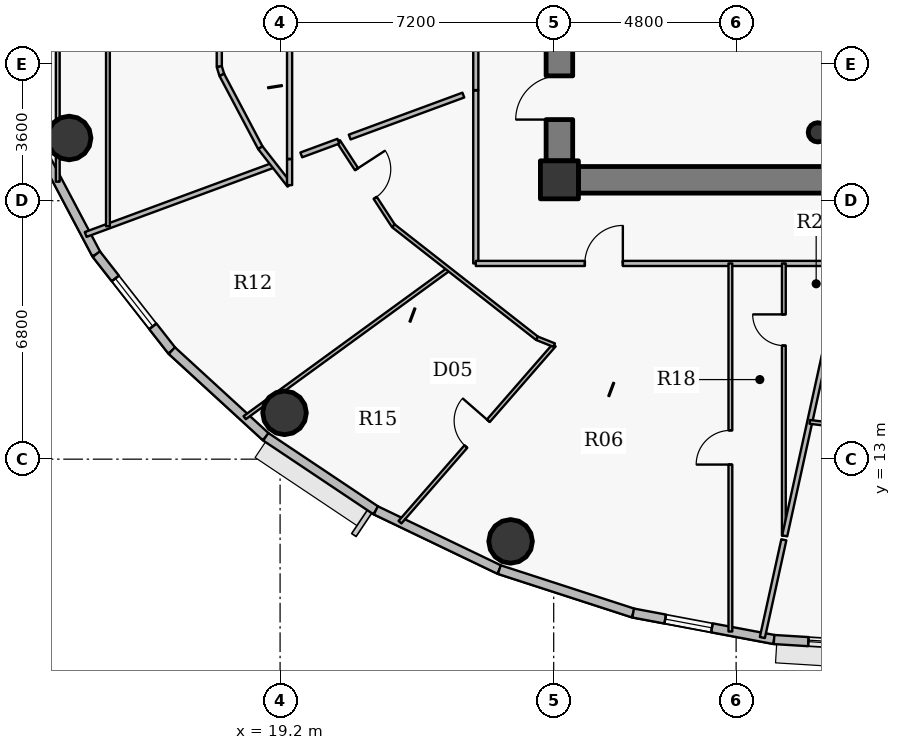
"""IFC4 building model, lengths in metres.
Left out: names, types, materials, properties, quantities, classifications, styles, units other than length and angle.
Written with IfcOpenShell. Run it as: python <this file> out.ifc"""

import sys

from ifc_helpers import new_model, si_unit, direction, frame, frame_2d, origin, origin_2d, place, context, subcontext, project, spatial, rectangle, hollow_circle, extrude, source, transform, mapped, element, fill, save


model = new_model("IFC4")
c1 = context("Model", 3, precision=1e-05, world=origin(), true_north=direction((0.0, 1.0)))
c2 = subcontext(c1, "Body", "Model", "MODEL_VIEW")
j1 = project(units=[si_unit("LENGTHUNIT", "METRE"), si_unit("PLANEANGLEUNIT", "RADIAN")], contexts=[c1])
p1 = place(None, origin())
s1 = spatial("IfcSite", under=j1, at=p1, CompositionType="ELEMENT")
p2 = place(p1, origin())
s2 = spatial("IfcBuilding", under=s1, at=p2, CompositionType="ELEMENT")
p3 = place(p2, frame((0.0, 0.0, 214.05)))
s3 = spatial("IfcBuildingStorey", under=s2, at=p3, CompositionType="ELEMENT", Elevation=214.05)
p4 = place(p3, frame((26.55, 20.35, 0.0), z_axis=(0.0, 0.0, 1.0), x_axis=(1.0, 0.0, 0.0)))
e1 = element("IfcColumn", 1, at=p4, inside=s3, PredefinedType="COLUMN", context=c2, shape_type="SweptSolid", body=[
    extrude(rectangle(XDim=1.0, YDim=1.0, at=origin_2d()), origin(), (0.0, 0.0, 1.0), 3.75),
])
p5 = place(p3, frame((33.35, 21.6, 0.0), z_axis=(0.0, 0.0, 1.0), x_axis=(1.0, 0.0, 0.0)))
e2 = element("IfcColumn", 2, at=p5, inside=s3, PredefinedType="COLUMN", context=c2, shape_type="SweptSolid", body=[
    extrude(hollow_circle(Radius=0.254, WallThickness=0.02, at=origin_2d()), origin(), (0.0, 0.0, 1.0), 3.75),
])
p6 = place(p3, frame((44.95, 20.35, 0.0), z_axis=(0.0, 0.0, 1.0), x_axis=(-1.0, 0.0, 0.0)))
e3 = element("IfcWall", 3, at=p6, inside=s3, PredefinedType="SHEAR", context=c2, shape_type="SweptSolid", body=[
    extrude(rectangle(XDim=17.9, YDim=0.7, at=frame_2d((8.95, 0.0))), origin(), (0.0, 0.0, 1.0), 3.05),
])
p7 = place(p6, frame((9.7, 0.0, 0.0)))
e4 = element("IfcOpeningElement", 4, at=p7, cuts=e3, PredefinedType="OPENING", context=c2, shape_type="SweptSolid", body=[
    extrude(rectangle(XDim=1.15, YDim=2.15, at=origin_2d()), frame((0.575, 0.36, 1.075), z_axis=(0.0, -1.0, 0.0), x_axis=(1.0, 0.0, 0.0)), (0.0, 0.0, 1.0), 0.72),
])
p8 = place(p3, frame((26.55, 20.85, 0.0), z_axis=(0.0, 0.0, 1.0), x_axis=(0.0, 1.0, 0.0)))
e5 = element("IfcWall", 5, at=p8, inside=s3, PredefinedType="SHEAR", context=c2, shape_type="SweptSolid", body=[
    extrude(rectangle(XDim=12.3, YDim=0.7, at=frame_2d((6.15, 0.0))), origin(), (0.0, 0.0, 1.0), 3.05),
])
p9 = place(p8, frame((1.085, 0.0, 0.0)))
e6 = element("IfcOpeningElement", 6, at=p9, cuts=e5, PredefinedType="OPENING", context=c2, shape_type="SweptSolid", body=[
    extrude(rectangle(XDim=1.15, YDim=2.15, at=origin_2d()), frame((0.575, 0.36, 1.075), z_axis=(0.0, -1.0, 0.0), x_axis=(1.0, 0.0, 0.0)), (0.0, 0.0, 1.0), 0.72),
])
for number, where, z_axis, x_axis in (
    (7, (13.649, 21.451, 0.0), (0.0, 0.0, 1.0), (1.0, 0.0, 0.0)),
    (8, (19.317, 14.219, 0.0), (0.0, 0.0, 1.0), (1.0, 0.0, 0.0)),
    (9, (25.265, 10.836, 0.0), (0.0, 0.0, 1.0), (1.0, 0.0, 0.0)),
):
    element("IfcColumn", number, at=place(p3, frame(where, z_axis=z_axis, x_axis=x_axis)), inside=s3, PredefinedType="COLUMN", context=c2, shape_type="SweptSolid", body=[
        extrude(hollow_circle(Radius=0.575, WallThickness=0.036, at=origin_2d()), origin(), (0.0, 0.0, 1.0), 3.75),
    ])
p10 = place(p3, frame((14.364, 18.395, 0.0), z_axis=(0.0, 0.0, 1.0), x_axis=(-0.46766049993, 0.883908172157, 0.0)))
e10 = element("IfcWall", 10, at=p10, inside=s3, PredefinedType="SOLIDWALL", context=c2, shape_type="SweptSolid", body=[
    extrude(rectangle(XDim=3.11, YDim=0.24, at=frame_2d((1.555, 0.0))), origin(), (0.0, 0.0, 1.0), 3.5),
])
p11 = place(p3, frame((16.352, 15.855, 0.0), z_axis=(0.0, 0.0, 1.0), x_axis=(-0.616312344705, 0.787501805562, 0.0)))
e11 = element("IfcWall", 11, at=p11, inside=s3, PredefinedType="SOLIDWALL", context=c2, shape_type="SweptSolid", body=[
    extrude(rectangle(XDim=3.225, YDim=0.24, at=frame_2d((1.612, 0.0))), origin(), (0.0, 0.0, 1.0), 3.5),
])
p12 = place(p11, frame((0.812, 0.0, 0.9)))
e12 = element("IfcOpeningElement", 12, at=p12, cuts=e11, PredefinedType="OPENING", context=c2, shape_type="SweptSolid", body=[
    extrude(rectangle(XDim=1.6, YDim=1.75, at=origin_2d()), frame((0.8, 0.13, 0.875), z_axis=(0.0, -1.0, 0.0), x_axis=(1.0, 0.0, 0.0)), (0.0, 0.0, 1.0), 0.26),
])
p13 = place(p3, frame((18.824, 13.589, 0.0), z_axis=(0.0, 0.0, 1.0), x_axis=(-0.737123922599, 0.675757591694, 0.0)))
e13 = element("IfcWall", 13, at=p13, inside=s3, PredefinedType="SOLIDWALL", context=c2, shape_type="SweptSolid", body=[
    extrude(rectangle(XDim=3.354, YDim=0.24, at=frame_2d((1.677, 0.0))), origin(), (0.0, 0.0, 1.0), 3.5),
])
p14 = place(p3, frame((21.72, 11.652, 0.0), z_axis=(0.0, 0.0, 1.0), x_axis=(-0.831262496074, 0.555880079352, 0.0)))
e14 = element("IfcWall", 14, at=p14, inside=s3, PredefinedType="SOLIDWALL", context=c2, shape_type="SweptSolid", body=[
    extrude(rectangle(XDim=3.484, YDim=0.24, at=frame_2d((1.742, 0.0))), origin(), (0.0, 0.0, 1.0), 3.5),
])
p15 = place(p3, frame((24.969, 10.094, 0.0), z_axis=(0.0, 0.0, 1.0), x_axis=(-0.901598104751, 0.432574684313, 0.0)))
e15 = element("IfcWall", 15, at=p15, inside=s3, PredefinedType="SOLIDWALL", context=c2, shape_type="SweptSolid", body=[
    extrude(rectangle(XDim=3.604, YDim=0.24, at=frame_2d((1.802, 0.0))), origin(), (0.0, 0.0, 1.0), 3.5),
])
p16 = place(p3, frame((28.491, 8.951, 0.0), z_axis=(0.0, 0.0, 1.0), x_axis=(-0.951210789182, 0.308541787354, 0.0)))
e16 = element("IfcWall", 16, at=p16, inside=s3, PredefinedType="SOLIDWALL", context=c2, shape_type="SweptSolid", body=[
    extrude(rectangle(XDim=3.702, YDim=0.24, at=frame_2d((1.851, 0.0))), origin(), (0.0, 0.0, 1.0), 3.5),
])
p17 = place(p3, frame((32.198, 8.254, 0.0), z_axis=(0.0, 0.0, 1.0), x_axis=(-0.982784898575, 0.184753465822, 0.0)))
e17 = element("IfcWall", 17, at=p17, inside=s3, PredefinedType="SOLIDWALL", context=c2, shape_type="SweptSolid", body=[
    extrude(rectangle(XDim=3.773, YDim=0.24, at=frame_2d((1.886, 0.0))), origin(), (0.0, 0.0, 1.0), 3.5),
])
p18 = place(p17, frame((1.664, 0.0, 0.9)))
e18 = element("IfcOpeningElement", 18, at=p18, cuts=e17, PredefinedType="OPENING", context=c2, shape_type="SweptSolid", body=[
    extrude(rectangle(XDim=1.25, YDim=1.65, at=origin_2d()), frame((0.625, 0.13, 0.825), z_axis=(0.0, -1.0, 0.0), x_axis=(1.0, 0.0, 0.0)), (0.0, 0.0, 1.0), 0.26),
])
p19 = place(p3, frame((36.0, 8.02, 0.0), z_axis=(0.0, 0.0, 1.0), x_axis=(-0.998108785312, 0.06147237333, 0.0)))
e19 = element("IfcWall", 19, at=p19, inside=s3, PredefinedType="SOLIDWALL", context=c2, shape_type="SweptSolid", body=[
    extrude(rectangle(XDim=3.809, YDim=0.24, at=frame_2d((1.904, 0.0))), origin(), (0.0, 0.0, 1.0), 3.5),
])
p20 = place(p19, frame((0.904, 0.0, 0.9)))
e20 = element("IfcOpeningElement", 20, at=p20, cuts=e19, PredefinedType="OPENING", context=c2, shape_type="SweptSolid", body=[
    extrude(rectangle(XDim=2.0, YDim=1.75, at=origin_2d()), frame((1.0, 0.13, 0.875), z_axis=(0.0, -1.0, 0.0), x_axis=(1.0, 0.0, 0.0)), (0.0, 0.0, 1.0), 0.26),
])
p21 = place(p3, frame((13.35, 20.301, 0.0), z_axis=(0.0, 0.0, 1.0), x_axis=(0.0, 1.0, 0.0)))
e21 = element("IfcWall", 21, at=p21, inside=s3, PredefinedType="PARTITIONING", context=c2, shape_type="SweptSolid", body=[
    extrude(rectangle(XDim=10.05, YDim=0.1, at=frame_2d((5.025, 0.0))), origin(), (0.0, 0.0, 1.0), 2.935),
])
p22 = place(p3, frame((14.085, 18.912, 0.0), z_axis=(0.0, 0.0, 1.0), x_axis=(0.938158194698, 0.346206877055, 0.0)))
e22 = element("IfcWall", 22, at=p22, inside=s3, PredefinedType="PARTITIONING", context=c2, shape_type="SweptSolid", body=[
    extrude(rectangle(XDim=5.278, YDim=0.135, at=frame_2d((2.639, 0.0))), origin(), (0.0, 0.0, 1.0), 2.985),
])
p23 = place(p3, frame((14.67, 19.128, 0.0), z_axis=(0.0, 0.0, 1.0), x_axis=(0.0, 1.0, 0.0)))
e23 = element("IfcWall", 23, at=p23, inside=s3, PredefinedType="PARTITIONING", context=c2, shape_type="SweptSolid", body=[
    extrude(rectangle(XDim=11.028, YDim=0.1, at=frame_2d((5.514, 0.0))), origin(), (0.0, 0.0, 1.0), 2.935),
])
p24 = place(p23, frame((5.064, 0.0, 0.0)))
e24 = element("IfcOpeningElement", 24, at=p24, cuts=e23, PredefinedType="OPENING", context=c2, shape_type="SweptSolid", body=[
    extrude(rectangle(XDim=0.9, YDim=2.1, at=origin_2d()), frame((0.45, 0.06, 1.05), z_axis=(0.0, -1.0, 0.0), x_axis=(1.0, 0.0, 0.0)), (0.0, 0.0, 1.0), 0.12),
])
p25 = place(p3, frame((17.6, 23.328, 0.0), z_axis=(0.0, 0.0, 1.0), x_axis=(0.0, 1.0, 0.0)))
e25 = element("IfcWall", 25, at=p25, inside=s3, PredefinedType="PARTITIONING", context=c2, shape_type="SweptSolid", body=[
    extrude(rectangle(XDim=4.622, YDim=0.135, at=frame_2d((2.311, 0.0))), origin(), (0.0, 0.0, 1.0), 2.935),
])
p26 = place(p3, frame((17.6, 23.328, 0.0), z_axis=(0.0, 0.0, 1.0), x_axis=(0.292875000845, -0.956150738053, 0.0)))
e26 = element("IfcWall", 26, at=p26, inside=s3, PredefinedType="PARTITIONING", context=c2, shape_type="SweptSolid", body=[
    extrude(rectangle(XDim=0.227, YDim=0.135, at=frame_2d((0.113, 0.0))), origin(), (0.0, 0.0, 1.0), 3.5),
])
p27 = place(p3, frame((17.667, 23.111, 0.0), z_axis=(0.0, 0.0, 1.0), x_axis=(0.467675622269, -0.883900171024, 0.0)))
e27 = element("IfcWall", 27, at=p27, inside=s3, PredefinedType="PARTITIONING", context=c2, shape_type="SweptSolid", body=[
    extrude(rectangle(XDim=2.168, YDim=0.135, at=frame_2d((1.084, 0.0))), origin(), (0.0, 0.0, 1.0), 2.935),
])
p28 = place(p3, frame((18.268, 14.092, 0.0), z_axis=(0.0, 0.0, 1.0), x_axis=(0.808481640117, 0.588521399436, 0.0)))
e28 = element("IfcWall", 28, at=p28, inside=s3, PredefinedType="PARTITIONING", context=c2, shape_type="SweptSolid", body=[
    extrude(rectangle(XDim=6.641, YDim=0.1, at=frame_2d((3.32, 0.0))), origin(), (0.0, 0.0, 1.0), 2.985),
])
p29 = place(p3, frame((18.681, 21.194, 0.0), z_axis=(0.0, 0.0, 1.0), x_axis=(0.616239706802, -0.787558647823, 0.0)))
e29 = element("IfcWall", 29, at=p29, inside=s3, PredefinedType="PARTITIONING", context=c2, shape_type="SweptSolid", body=[
    extrude(rectangle(XDim=1.248, YDim=0.135, at=frame_2d((0.624, 0.0))), origin(), (0.0, 0.0, 1.0), 3.5),
])
p30 = place(p3, frame((19.45, 20.211, 0.0), z_axis=(0.0, 0.0, 1.0), x_axis=(0.0, 1.0, 0.0)))
e30 = element("IfcWall", 30, at=p30, inside=s3, PredefinedType="PARTITIONING", context=c2, shape_type="SweptSolid", body=[
    extrude(rectangle(XDim=0.681, YDim=0.135, at=frame_2d((0.34, 0.0))), origin(), (0.0, 0.0, 1.0), 3.5),
])
p31 = place(p3, frame((20.733, 21.366, 0.0), z_axis=(0.0, 0.0, 1.0), x_axis=(0.545375949152, -0.838191549758, 0.0)))
e31 = element("IfcWall", 31, at=p31, inside=s3, PredefinedType="PARTITIONING", context=c2, shape_type="SweptSolid", body=[
    extrude(rectangle(XDim=2.656, YDim=0.1, at=frame_2d((1.328, 0.0))), origin(), (0.0, 0.0, 1.0), 3.5),
])
p32 = place(p31, frame((0.878, 0.0, 0.0)))
e32 = element("IfcOpeningElement", 32, at=p32, cuts=e31, PredefinedType="OPENING", context=c2, shape_type="SweptSolid", body=[
    extrude(rectangle(XDim=0.9, YDim=2.1, at=origin_2d()), frame((0.45, 0.06, 1.05), z_axis=(0.0, -1.0, 0.0), x_axis=(1.0, 0.0, 0.0)), (0.0, 0.0, 1.0), 0.12),
])
p33 = place(p3, frame((22.182, 19.139, 0.0), z_axis=(0.0, 0.0, 1.0), x_axis=(0.787386902975, -0.616459134917, 0.0)))
e33 = element("IfcWall", 33, at=p33, inside=s3, PredefinedType="PARTITIONING", context=c2, shape_type="SweptSolid", body=[
    extrude(rectangle(XDim=4.799, YDim=0.1, at=frame_2d((2.399, 0.0))), origin(), (0.0, 0.0, 1.0), 2.935),
])
p34 = place(p3, frame((22.355, 11.342, 0.0), z_axis=(0.0, 0.0, 1.0), x_axis=(0.657017747133, 0.753875108989, 0.0)))
e34 = element("IfcWall", 34, at=p34, inside=s3, PredefinedType="PARTITIONING", context=c2, shape_type="SweptSolid", body=[
    extrude(rectangle(XDim=6.178, YDim=0.1, at=frame_2d((3.089, 0.0))), origin(), (0.0, 0.0, 1.0), 2.985),
])
p35 = place(p34, frame((2.639, 0.0, 0.0)))
e35 = element("IfcOpeningElement", 35, at=p35, cuts=e34, PredefinedType="OPENING", context=c2, shape_type="SweptSolid", body=[
    extrude(rectangle(XDim=0.9, YDim=2.1, at=origin_2d()), frame((0.45, 0.06, 1.05), z_axis=(0.0, -1.0, 0.0), x_axis=(1.0, 0.0, 0.0)), (0.0, 0.0, 1.0), 0.12),
])
p36 = place(p3, frame((24.35, 18.15, 0.0), z_axis=(0.0, 0.0, 1.0), x_axis=(0.0, 1.0, 0.0)))
e36 = element("IfcWall", 36, at=p36, inside=s3, PredefinedType="PARTITIONING", context=c2, shape_type="SweptSolid", body=[
    extrude(rectangle(XDim=4.551, YDim=0.135, at=frame_2d((2.275, 0.0))), origin(), (0.0, 0.0, 1.0), 2.935),
])
p37 = place(p3, frame((24.35, 18.15, 0.0), z_axis=(0.0, 0.0, 1.0), x_axis=(1.0, 0.0, 0.0)))
e37 = element("IfcWall", 37, at=p37, inside=s3, PredefinedType="PARTITIONING", context=c2, shape_type="SweptSolid", body=[
    extrude(rectangle(XDim=23.85, YDim=0.135, at=frame_2d((11.925, 0.0))), origin(), (0.0, 0.0, 1.0), 2.935),
])
p38 = place(p37, frame((2.87, 0.0, 0.0)))
e38 = element("IfcOpeningElement", 38, at=p38, cuts=e37, PredefinedType="OPENING", context=c2, shape_type="SweptSolid", body=[
    extrude(rectangle(XDim=1.0, YDim=2.15, at=origin_2d()), frame((0.5, 0.078, 1.075), z_axis=(0.0, -1.0, 0.0), x_axis=(1.0, 0.0, 0.0)), (0.0, 0.0, 1.0), 0.155),
])
p39 = place(p37, frame((16.13, 0.0, 0.0)))
e39 = element("IfcOpeningElement", 39, at=p39, cuts=e37, PredefinedType="OPENING", context=c2, shape_type="SweptSolid", body=[
    extrude(rectangle(XDim=1.0, YDim=2.15, at=origin_2d()), frame((0.5, 0.078, 1.075), z_axis=(0.0, -1.0, 0.0), x_axis=(1.0, 0.0, 0.0)), (0.0, 0.0, 1.0), 0.155),
])
p40 = place(p3, frame((25.961, 16.181, 0.0), z_axis=(0.0, 0.0, 1.0), x_axis=(0.928718060564, -0.370786682585, 0.0)))
e40 = element("IfcWall", 40, at=p40, inside=s3, PredefinedType="PARTITIONING", context=c2, shape_type="SweptSolid", body=[
    extrude(rectangle(XDim=0.488, YDim=0.1, at=frame_2d((0.244, 0.0))), origin(), (0.0, 0.0, 1.0), 3.5),
])
p41 = place(p3, frame((31.049, 8.465, 0.0), z_axis=(0.0, 0.0, 1.0), x_axis=(0.0, 1.0, 0.0)))
e41 = element("IfcWall", 41, at=p41, inside=s3, PredefinedType="PARTITIONING", context=c2, shape_type="SweptSolid", body=[
    extrude(rectangle(XDim=9.685, YDim=0.1, at=frame_2d((4.842, 0.0))), origin(), (0.0, 0.0, 1.0), 2.985),
])
p42 = place(p41, frame((4.392, 0.0, 0.0)))
e42 = element("IfcOpeningElement", 42, at=p42, cuts=e41, PredefinedType="OPENING", context=c2, shape_type="SweptSolid", body=[
    extrude(rectangle(XDim=0.9, YDim=2.1, at=origin_2d()), frame((0.45, 0.06, 1.05), z_axis=(0.0, -1.0, 0.0), x_axis=(1.0, 0.0, 0.0)), (0.0, 0.0, 1.0), 0.12),
])
p43 = place(p3, frame((31.891, 8.307, 0.0), z_axis=(0.0, 0.0, 1.0), x_axis=(0.214700779338, 0.976679873526, 0.0)))
e43 = element("IfcWall", 43, at=p43, inside=s3, PredefinedType="PARTITIONING", context=c2, shape_type="SweptSolid", body=[
    extrude(rectangle(XDim=2.632, YDim=0.135, at=frame_2d((1.316, 0.0))), origin(), (0.0, 0.0, 1.0), 2.985),
])
p44 = place(p3, frame((32.456, 10.985, 0.0), z_axis=(0.0, 0.0, 1.0), x_axis=(0.0, 1.0, 0.0)))
e44 = element("IfcWall", 44, at=p44, inside=s3, PredefinedType="PARTITIONING", context=c2, shape_type="SweptSolid", body=[
    extrude(rectangle(XDim=7.165, YDim=0.1, at=frame_2d((3.582, 0.0))), origin(), (0.0, 0.0, 1.0), 3.5),
])
p45 = place(p44, frame((5.004, 0.0, 0.0)))
e45 = element("IfcOpeningElement", 45, at=p45, cuts=e44, PredefinedType="OPENING", context=c2, shape_type="SweptSolid", body=[
    extrude(rectangle(XDim=0.82, YDim=2.1, at=origin_2d()), frame((0.41, 0.06, 1.05), z_axis=(0.0, -1.0, 0.0), x_axis=(1.0, 0.0, 0.0)), (0.0, 0.0, 1.0), 0.12),
])
p46 = place(p3, frame((32.479, 10.983, 0.0), z_axis=(0.0, 0.0, 1.0), x_axis=(0.214685976808, 0.976683127407, 0.0)))
e46 = element("IfcWall", 46, at=p46, inside=s3, PredefinedType="PARTITIONING", context=c2, shape_type="SweptSolid", body=[
    extrude(rectangle(XDim=7.338, YDim=0.135, at=frame_2d((3.669, 0.0))), origin(), (0.0, 0.0, 1.0), 3.5),
])
p47 = place(p3, frame((33.138, 13.981, 0.0), z_axis=(0.0, 0.0, 1.0), x_axis=(0.99239465631, -0.123096897311, 0.0)))
e47 = element("IfcWall", 47, at=p47, inside=s3, PredefinedType="PARTITIONING", context=c2, shape_type="SweptSolid", body=[
    extrude(rectangle(XDim=2.884, YDim=0.1, at=frame_2d((1.442, 0.0))), origin(), (0.0, 0.0, 1.0), 2.935),
])
p48 = place(p3, frame((19.45, 26.05, 0.0), z_axis=(0.0, 0.0, 1.0), x_axis=(0.0, -1.0, 0.0)))
e48 = element("IfcWall", 48, at=p48, inside=s3, PredefinedType="PARTITIONING", context=c2, shape_type="SweptSolid", body=[
    extrude(rectangle(XDim=5.148, YDim=0.135, at=frame_2d((2.574, 0.0))), origin(), (0.0, 0.0, 1.0), 2.935),
])
p49 = place(p3, frame((26.2, 20.84, 0.0), z_axis=(0.0, 0.0, 1.0), x_axis=(0.0, -1.0, 0.0)))
e49 = element("IfcWall", 49, at=p49, inside=s3, PredefinedType="PARTITIONING", context=c2, shape_type="SweptSolid", body=[
    extrude(rectangle(XDim=0.84, YDim=0.135, at=frame_2d((0.42, 0.0))), origin(), (0.0, 0.0, 1.0), 3.5),
])
p50 = place(p3, frame((26.508, 20.0, 0.0), z_axis=(0.0, 0.0, 1.0), x_axis=(1.0, 0.0, 0.0)))
e50 = element("IfcWall", 50, at=p50, inside=s3, PredefinedType="PARTITIONING", context=c2, shape_type="SweptSolid", body=[
    extrude(rectangle(XDim=0.532, YDim=0.135, at=frame_2d((0.266, 0.0))), origin(), (0.0, 0.0, 1.0), 2.935),
])
p51 = place(p3, frame((24.35, 22.71, 0.0), z_axis=(0.0, 0.0, 1.0), x_axis=(0.0, 1.0, 0.0)))
e51 = element("IfcWall", 51, at=p51, inside=s3, PredefinedType="PARTITIONING", context=c2, shape_type="SweptSolid", body=[
    extrude(rectangle(XDim=3.34, YDim=0.135, at=frame_2d((1.67, 0.0))), origin(), (0.0, 0.0, 1.0), 2.935),
])
p52 = place(p3, frame((21.031, 21.476, 0.0), z_axis=(0.0, 0.0, 1.0), x_axis=(0.938166504217, 0.346184358926, 0.0)))
e52 = element("IfcWall", 52, at=p52, inside=s3, PredefinedType="PARTITIONING", context=c2, shape_type="SweptSolid", body=[
    extrude(rectangle(XDim=3.188, YDim=0.135, at=frame_2d((1.594, 0.0))), origin(), (0.0, 0.0, 1.0), 3.5),
])
p53 = place(p3, frame((19.758, 21.006, 0.0), z_axis=(0.0, 0.0, 1.0), x_axis=(0.938130503792, 0.346281905179, 0.0)))
e53 = element("IfcWall", 53, at=p53, inside=s3, PredefinedType="PARTITIONING", context=c2, shape_type="SweptSolid", body=[
    extrude(rectangle(XDim=1.04, YDim=0.135, at=frame_2d((0.52, 0.0))), origin(), (0.0, 0.0, 1.0), 3.5),
])
m1 = source(origin(), c2, "Body", "SweptSolid", [
    extrude(rectangle(XDim=1.6, YDim=1.75, at=origin_2d()), frame((0.8, 0.03, 0.875), z_axis=(0.0, -1.0, 0.0), x_axis=(1.0, 0.0, 0.0)), (0.0, 0.0, 1.0), 0.06),
])
p54 = place(p12, origin())
e54 = element("IfcWindow", 54, at=p54, inside=s3, PartitioningType="DOUBLE_PANEL_VERTICAL", PredefinedType="WINDOW", context=c2, shape_type="MappedRepresentation", body=[
    mapped(m1, transform((0.0, 0.0, 0.0), x_axis=(1.0, 0.0, 0.0), y_axis=(0.0, 1.0, 0.0), z_axis=(0.0, 0.0, 1.0), scale=1.0)),
])
fill(e12, e54)
m2 = source(origin(), c2, "Body", "SweptSolid", [
    extrude(rectangle(XDim=1.25, YDim=1.65, at=origin_2d()), frame((0.625, 0.03, 0.825), z_axis=(0.0, -1.0, 0.0), x_axis=(1.0, 0.0, 0.0)), (0.0, 0.0, 1.0), 0.06),
])
p55 = place(p18, origin())
e55 = element("IfcWindow", 55, at=p55, inside=s3, PartitioningType="SINGLE_PANEL", PredefinedType="WINDOW", context=c2, shape_type="MappedRepresentation", body=[
    mapped(m2, transform((0.0, 0.0, 0.0), x_axis=(1.0, 0.0, 0.0), y_axis=(0.0, 1.0, 0.0), z_axis=(0.0, 0.0, 1.0), scale=1.0)),
])
fill(e18, e55)
m3 = source(origin(), c2, "Body", "SweptSolid", [
    extrude(rectangle(XDim=2.0, YDim=1.75, at=origin_2d()), frame((1.0, 0.03, 0.875), z_axis=(0.0, -1.0, 0.0), x_axis=(1.0, 0.0, 0.0)), (0.0, 0.0, 1.0), 0.06),
])
p56 = place(p20, origin())
e56 = element("IfcWindow", 56, at=p56, inside=s3, PartitioningType="DOUBLE_PANEL_VERTICAL", PredefinedType="WINDOW", context=c2, shape_type="MappedRepresentation", body=[
    mapped(m3, transform((0.0, 0.0, 0.0), x_axis=(1.0, 0.0, 0.0), y_axis=(0.0, 1.0, 0.0), z_axis=(0.0, 0.0, 1.0), scale=1.0)),
])
fill(e20, e56)
m4 = source(origin(), c2, "Body", "SweptSolid", [
    extrude(rectangle(XDim=1.15, YDim=2.15, at=origin_2d()), frame((0.575, 0.025, 1.075), z_axis=(0.0, -1.0, 0.0), x_axis=(1.0, 0.0, 0.0)), (0.0, 0.0, 1.0), 0.05),
])
p57 = place(p9, origin())
e57 = element("IfcDoor", 57, at=p57, inside=s3, OperationType="SINGLE_SWING_LEFT", PredefinedType="DOOR", context=c2, shape_type="MappedRepresentation", body=[
    mapped(m4, transform((0.0, 0.0, 0.0), x_axis=(1.0, 0.0, 0.0), y_axis=(0.0, 1.0, 0.0), z_axis=(0.0, 0.0, 1.0), scale=1.0)),
])
fill(e6, e57)
m5 = source(origin(), c2, "Body", "SweptSolid", [
    extrude(rectangle(XDim=1.0, YDim=2.15, at=origin_2d()), frame((0.5, 0.025, 1.075), z_axis=(0.0, -1.0, 0.0), x_axis=(1.0, 0.0, 0.0)), (0.0, 0.0, 1.0), 0.05),
])
p58 = place(p38, origin())
e58 = element("IfcDoor", 58, at=p58, inside=s3, OperationType="SINGLE_SWING_RIGHT", PredefinedType="DOOR", context=c2, shape_type="MappedRepresentation", body=[
    mapped(m5, transform((0.0, 0.0, 0.0), x_axis=(1.0, 0.0, 0.0), y_axis=(0.0, 1.0, 0.0), z_axis=(0.0, 0.0, 1.0), scale=1.0)),
])
fill(e38, e58)
m6 = source(origin(), c2, "Body", "SweptSolid", [
    extrude(rectangle(XDim=0.9, YDim=2.1, at=origin_2d()), frame((0.45, 0.025, 1.05), z_axis=(0.0, -1.0, 0.0), x_axis=(1.0, 0.0, 0.0)), (0.0, 0.0, 1.0), 0.05),
])
p59 = place(p32, origin())
e59 = element("IfcDoor", 59, at=p59, inside=s3, OperationType="SINGLE_SWING_LEFT", PredefinedType="DOOR", context=c2, shape_type="MappedRepresentation", body=[
    mapped(m6, transform((0.0, 0.0, 0.0), x_axis=(1.0, 0.0, 0.0), y_axis=(0.0, 1.0, 0.0), z_axis=(0.0, 0.0, 1.0), scale=1.0)),
])
fill(e32, e59)
p60 = place(p35, origin())
e60 = element("IfcDoor", 60, at=p60, inside=s3, OperationType="SINGLE_SWING_RIGHT", PredefinedType="DOOR", context=c2, shape_type="MappedRepresentation", body=[
    mapped(m6, transform((0.0, 0.0, 0.0), x_axis=(1.0, 0.0, 0.0), y_axis=(0.0, 1.0, 0.0), z_axis=(0.0, 0.0, 1.0), scale=1.0)),
])
fill(e35, e60)
p61 = place(p42, origin())
e61 = element("IfcDoor", 61, at=p61, inside=s3, OperationType="SINGLE_SWING_LEFT", PredefinedType="DOOR", context=c2, shape_type="MappedRepresentation", body=[
    mapped(m6, transform((0.0, 0.0, 0.0), x_axis=(1.0, 0.0, 0.0), y_axis=(0.0, 1.0, 0.0), z_axis=(0.0, 0.0, 1.0), scale=1.0)),
])
fill(e42, e61)
m7 = source(origin(), c2, "Body", "SweptSolid", [
    extrude(rectangle(XDim=0.82, YDim=2.1, at=origin_2d()), frame((0.41, 0.025, 1.05), z_axis=(0.0, -1.0, 0.0), x_axis=(1.0, 0.0, 0.0)), (0.0, 0.0, 1.0), 0.05),
])
p62 = place(p45, origin())
e62 = element("IfcDoor", 62, at=p62, inside=s3, OperationType="SINGLE_SWING_RIGHT", PredefinedType="DOOR", context=c2, shape_type="MappedRepresentation", body=[
    mapped(m7, transform((0.0, 0.0, 0.0), x_axis=(1.0, 0.0, 0.0), y_axis=(0.0, 1.0, 0.0), z_axis=(0.0, 0.0, 1.0), scale=1.0)),
])
fill(e45, e62)
save(model, sys.argv[1])
